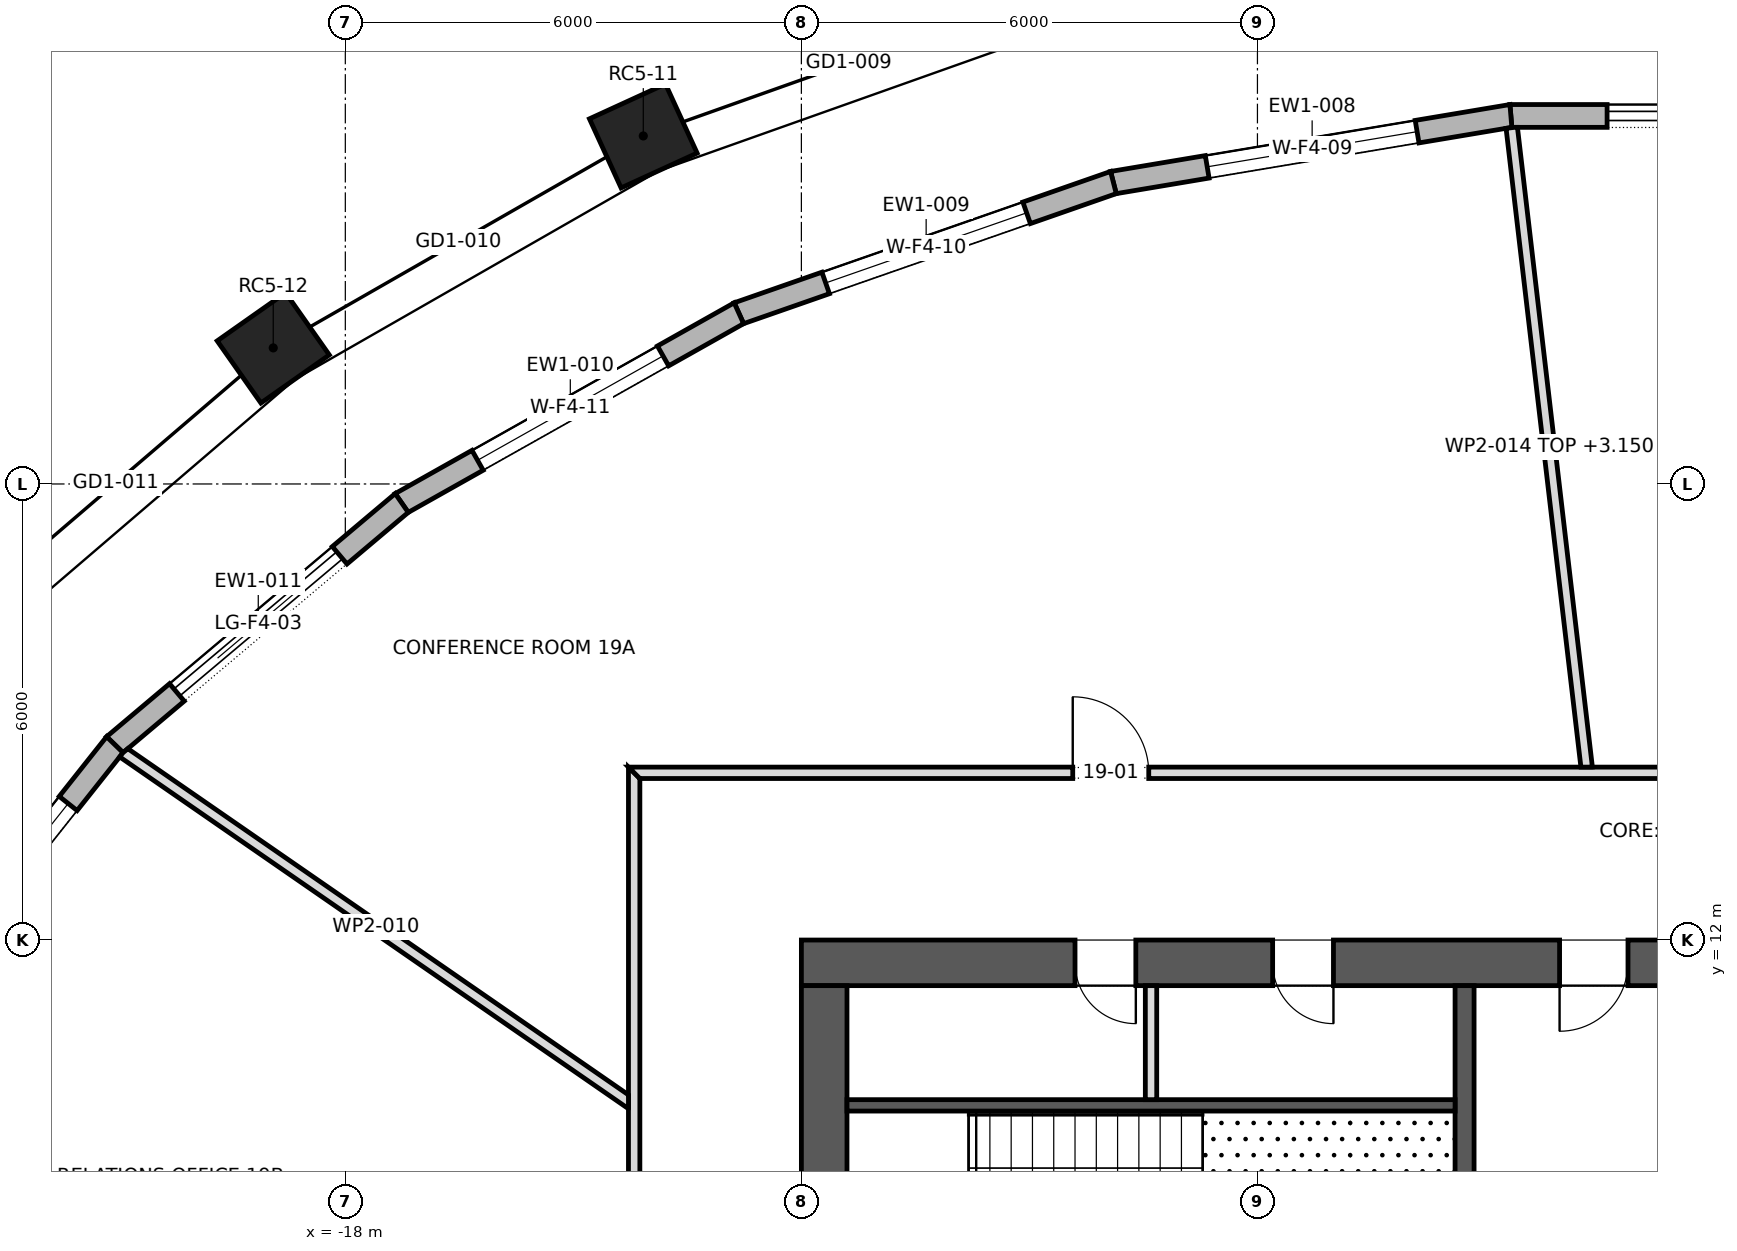
"""IFC4 building model, lengths in metres.
Left out: names, types, materials, properties, quantities, classifications, styles, units other than length and angle.
Written with IfcOpenShell. Run it as: python <this file> out.ifc"""

import sys

from ifc_helpers import new_model, si_unit, direction, frame, frame_2d, origin, origin_2d, place, context, subcontext, project, spatial, polyline, rectangle, outline, extrude, element, fill, save


model = new_model("IFC4")
c1 = context("Model", 3, precision=1e-05, world=origin(), true_north=direction((0.0, 1.0)))
c2 = subcontext(c1, "Body", "Model", "MODEL_VIEW")
j1 = project(units=[si_unit("LENGTHUNIT", "METRE"), si_unit("PLANEANGLEUNIT", "RADIAN")], contexts=[c1])
p1 = place(None, origin())
s1 = spatial("IfcSite", under=j1, at=p1, CompositionType="ELEMENT")
p2 = place(p1, origin())
s2 = spatial("IfcBuilding", under=s1, at=p2, CompositionType="ELEMENT")
p3 = place(p2, frame((0.0, 0.0, 268.3)))
s3 = spatial("IfcBuildingStorey", under=s2, at=p3, CompositionType="ELEMENT", Elevation=268.3)
for number, where, z_axis, x_axis in (
    (1, (-14.08, 22.579, 0.0), (0.0, 0.0, 1.0), (-0.909, -0.417, 0.0)),
    (2, (-18.948, 19.79, 0.0), (0.0, 0.0, 1.0), (-0.818, -0.575, 0.0)),
):
    element("IfcColumn", number, at=place(p3, frame(where, z_axis=z_axis, x_axis=x_axis)), inside=s3, PredefinedType="COLUMN", context=c2, shape_type="SweptSolid", body=[
        extrude(rectangle(XDim=1.1, YDim=1.0, at=origin_2d()), origin(), (0.0, 0.0, 1.0), 4.0),
    ])
p4 = place(p3, frame((-12.0, 11.7, 0.0), z_axis=(0.0, 0.0, 1.0), x_axis=(1.0, 0.0, 0.0)))
e3 = element("IfcWall", 3, at=p4, inside=s3, PredefinedType="SHEAR", context=c2, shape_type="SweptSolid", body=[
    extrude(rectangle(XDim=24.0, YDim=0.6, at=frame_2d((12.0, 0.0))), origin(), (0.0, 0.0, 1.0), 4.0),
])
p5 = place(p4, frame((9.975, 0.0, 0.0)))
e4 = element("IfcOpeningElement", 4, at=p5, cuts=e3, PredefinedType="OPENING", context=c2, shape_type="SweptSolid", body=[
    extrude(rectangle(XDim=0.9, YDim=2.1, at=frame_2d((0.45, 1.05))), frame((0.0, 0.312, 0.0), z_axis=(0.0, -1.0, 0.0), x_axis=(1.0, 0.0, 0.0)), (0.0, 0.0, 1.0), 0.624),
])
p6 = place(p4, frame((3.6, 0.0, 0.0)))
e5 = element("IfcOpeningElement", 5, at=p6, cuts=e3, PredefinedType="OPENING", context=c2, shape_type="SweptSolid", body=[
    extrude(rectangle(XDim=0.8, YDim=2.1, at=frame_2d((0.4, 1.05))), frame((0.0, 0.312, 0.0), z_axis=(0.0, -1.0, 0.0), x_axis=(1.0, 0.0, 0.0)), (0.0, 0.0, 1.0), 0.624),
])
p7 = place(p4, frame((6.2, 0.0, 0.0)))
e6 = element("IfcOpeningElement", 6, at=p7, cuts=e3, PredefinedType="OPENING", context=c2, shape_type="SweptSolid", body=[
    extrude(rectangle(XDim=0.8, YDim=2.1, at=frame_2d((0.4, 1.05))), frame((0.0, 0.312, 0.0), z_axis=(0.0, -1.0, 0.0), x_axis=(1.0, 0.0, 0.0)), (0.0, 0.0, 1.0), 0.624),
])
p8 = place(p4, frame((15.85, 0.0, 0.0)))
e7 = element("IfcOpeningElement", 7, at=p8, cuts=e3, PredefinedType="OPENING", context=c2, shape_type="SweptSolid", body=[
    extrude(rectangle(XDim=0.8, YDim=2.1, at=frame_2d((0.4, 1.05))), frame((0.0, 0.312, 0.0), z_axis=(0.0, -1.0, 0.0), x_axis=(1.0, 0.0, 0.0)), (0.0, 0.0, 1.0), 0.624),
])
p9 = place(p3, frame((-11.7, -11.4, 0.0), z_axis=(0.0, 0.0, 1.0), x_axis=(0.0, 1.0, 0.0)))
e8 = element("IfcWall", 8, at=p9, inside=s3, PredefinedType="SHEAR", context=c2, shape_type="SweptSolid", body=[
    extrude(rectangle(XDim=22.8, YDim=0.6, at=frame_2d((11.4, 0.0))), origin(), (0.0, 0.0, 1.0), 4.0),
])
p10 = place(p9, frame((10.2, 0.0, 0.0)))
e9 = element("IfcOpeningElement", 9, at=p10, cuts=e8, PredefinedType="OPENING", context=c2, shape_type="SweptSolid", body=[
    extrude(rectangle(XDim=2.4, YDim=2.1, at=frame_2d((1.2, 1.05))), frame((0.0, 0.312, 0.0), z_axis=(0.0, -1.0, 0.0), x_axis=(1.0, 0.0, 0.0)), (0.0, 0.0, 1.0), 0.624),
])
p11 = place(p9, frame((18.925, 0.0, 0.0)))
e10 = element("IfcOpeningElement", 10, at=p11, cuts=e8, PredefinedType="OPENING", context=c2, shape_type="SweptSolid", body=[
    extrude(rectangle(XDim=1.2, YDim=2.1, at=frame_2d((0.6, 1.05))), frame((0.0, 0.312, 0.0), z_axis=(0.0, -1.0, 0.0), x_axis=(1.0, 0.0, 0.0)), (0.0, 0.0, 1.0), 0.624),
])
p12 = place(p9, frame((2.675, 0.0, 0.0)))
e11 = element("IfcOpeningElement", 11, at=p12, cuts=e8, PredefinedType="OPENING", context=c2, shape_type="SweptSolid", body=[
    extrude(rectangle(XDim=1.2, YDim=2.1, at=frame_2d((0.6, 1.05))), frame((0.0, 0.312, 0.0), z_axis=(0.0, -1.0, 0.0), x_axis=(1.0, 0.0, 0.0)), (0.0, 0.0, 1.0), 0.624),
])
p13 = place(p3, frame((2.666, 22.842, 0.0), z_axis=(0.0, 0.0, 1.0), x_axis=(-1.0, 0.0, 0.0)))
e12 = element("IfcWall", 12, at=p13, inside=s3, PredefinedType="STANDARD", context=c2, shape_type="SweptSolid", body=[
    extrude(outline(polyline([(-0.012, -0.15), (5.344, -0.15), (5.319, 0.15), (0.012, 0.15), (-0.012, -0.15)])), origin(), (0.0, 0.0, 1.0), 3.7),
])
p14 = place(p13, frame((1.266, 0.0, 0.0)))
e13 = element("IfcOpeningElement", 13, at=p14, cuts=e12, PredefinedType="OPENING", context=c2, shape_type="SweptSolid", body=[
    extrude(rectangle(XDim=2.8, YDim=3.25, at=frame_2d((1.4, 1.625))), frame((0.0, 0.162, 0.0), z_axis=(0.0, -1.0, 0.0), x_axis=(1.0, 0.0, 0.0)), (0.0, 0.0, 1.0), 0.324),
])
p15 = place(p3, frame((-2.666, 22.842, 0.0), z_axis=(0.0, 0.0, 1.0), x_axis=(-0.986250435411, -0.165257612993, 0.0)))
e14 = element("IfcWall", 14, at=p15, inside=s3, PredefinedType="STANDARD", context=c2, shape_type="SweptSolid", body=[
    extrude(outline(polyline([(-0.012, -0.15), (5.315, -0.15), (5.29, 0.15), (0.012, 0.15), (-0.012, -0.15)])), origin(), (0.0, 0.0, 1.0), 3.7),
])
p16 = place(p15, frame((1.251, 0.0, 0.6)))
e15 = element("IfcOpeningElement", 15, at=p16, cuts=e14, PredefinedType="OPENING", context=c2, shape_type="SweptSolid", body=[
    extrude(rectangle(XDim=2.8, YDim=2.65, at=frame_2d((1.4, 1.325))), frame((0.0, 0.162, 0.0), z_axis=(0.0, -1.0, 0.0), x_axis=(1.0, 0.0, 0.0)), (0.0, 0.0, 1.0), 0.324),
])
p17 = place(p3, frame((-7.895, 21.966, 0.0), z_axis=(0.0, 0.0, 1.0), x_axis=(-0.9441693858, -0.329460423904, 0.0)))
e16 = element("IfcWall", 16, at=p17, inside=s3, PredefinedType="STANDARD", context=c2, shape_type="SweptSolid", body=[
    extrude(outline(polyline([(-0.013, -0.15), (5.232, -0.15), (5.205, 0.15), (0.013, 0.15), (-0.013, -0.15)])), origin(), (0.0, 0.0, 1.0), 3.7),
])
p18 = place(p17, frame((1.209, 0.0, 0.6)))
e17 = element("IfcOpeningElement", 17, at=p18, cuts=e16, PredefinedType="OPENING", context=c2, shape_type="SweptSolid", body=[
    extrude(rectangle(XDim=2.8, YDim=2.65, at=frame_2d((1.4, 1.325))), frame((0.0, 0.162, 0.0), z_axis=(0.0, -1.0, 0.0), x_axis=(1.0, 0.0, 0.0)), (0.0, 0.0, 1.0), 0.324),
])
p19 = place(p3, frame((-12.822, 20.246, 0.0), z_axis=(0.0, 0.0, 1.0), x_axis=(-0.871433320402, -0.490513983585, 0.0)))
e18 = element("IfcWall", 18, at=p19, inside=s3, PredefinedType="STANDARD", context=c2, shape_type="SweptSolid", body=[
    extrude(outline(polyline([(-0.013, -0.15), (5.104, -0.15), (5.076, 0.15), (0.013, 0.15), (-0.013, -0.15)])), origin(), (0.0, 0.0, 1.0), 3.7),
])
p20 = place(p19, frame((1.145, 0.0, 0.6)))
e19 = element("IfcOpeningElement", 19, at=p20, cuts=e18, PredefinedType="OPENING", context=c2, shape_type="SweptSolid", body=[
    extrude(rectangle(XDim=2.8, YDim=2.65, at=frame_2d((1.4, 1.325))), frame((0.0, 0.162, 0.0), z_axis=(0.0, -1.0, 0.0), x_axis=(1.0, 0.0, 0.0)), (0.0, 0.0, 1.0), 0.324),
])
p21 = place(p3, frame((-17.258, 17.75, 0.0), z_axis=(0.0, 0.0, 1.0), x_axis=(-0.764832940795, -0.644228664897, 0.0)))
e20 = element("IfcWall", 20, at=p21, inside=s3, PredefinedType="STANDARD", context=c2, shape_type="SweptSolid", body=[
    extrude(outline(polyline([(-0.014, -0.15), (4.95, -0.15), (4.92, 0.15), (0.014, 0.15), (-0.014, -0.15)])), origin(), (0.0, 0.0, 1.0), 3.7),
])
p22 = place(p21, frame((1.068, 0.0, 0.0)))
e21 = element("IfcOpeningElement", 21, at=p22, cuts=e20, PredefinedType="OPENING", context=c2, shape_type="SweptSolid", body=[
    extrude(rectangle(XDim=2.8, YDim=3.25, at=frame_2d((1.4, 1.625))), frame((0.0, 0.162, 0.0), z_axis=(0.0, -1.0, 0.0), x_axis=(1.0, 0.0, 0.0)), (0.0, 0.0, 1.0), 0.324),
])
p23 = place(p3, frame((-21.032, 14.57, 0.0), z_axis=(0.0, 0.0, 1.0), x_axis=(-0.621434755851, -0.783465917715, 0.0)))
e22 = element("IfcWall", 22, at=p23, inside=s3, PredefinedType="STANDARD", context=c2, shape_type="SweptSolid", body=[
    extrude(outline(polyline([(-0.015, -0.15), (4.791, -0.15), (4.759, 0.15), (0.015, 0.15), (-0.015, -0.15)])), origin(), (0.0, 0.0, 1.0), 3.7),
])
p24 = place(p23, frame((0.987, 0.0, 0.6)))
e23 = element("IfcOpeningElement", 23, at=p24, cuts=e22, PredefinedType="OPENING", context=c2, shape_type="SweptSolid", body=[
    extrude(rectangle(XDim=2.8, YDim=2.65, at=frame_2d((1.4, 1.325))), frame((0.0, 0.162, 0.0), z_axis=(0.0, -1.0, 0.0), x_axis=(1.0, 0.0, 0.0)), (0.0, 0.0, 1.0), 0.324),
])
p25 = place(p3, frame((-3.275, 6.5, 0.0), z_axis=(0.0, 0.0, 1.0), x_axis=(0.0, 1.0, 0.0)))
e24 = element("IfcWall", 24, at=p25, inside=s3, PredefinedType="SHEAR", context=c2, shape_type="SweptSolid", body=[
    extrude(rectangle(XDim=4.9, YDim=0.25, at=frame_2d((2.45, 0.0))), origin(), (0.0, 0.0, 1.0), 3.7),
])
p26 = place(p3, frame((-11.4, 9.825, 0.0), z_axis=(0.0, 0.0, 1.0), x_axis=(1.0, 0.0, 0.0)))
e25 = element("IfcWall", 25, at=p26, inside=s3, PredefinedType="SHEAR", context=c2, shape_type="SweptSolid", body=[
    extrude(rectangle(XDim=8.0, YDim=0.15, at=frame_2d((4.0, 0.0))), origin(), (0.0, 0.0, 1.0), 3.7),
])
p27 = place(p3, frame((-7.4, 9.9, 0.0), z_axis=(0.0, 0.0, 1.0), x_axis=(0.0, 1.0, 0.0)))
e26 = element("IfcWall", 26, at=p27, inside=s3, PredefinedType="PARTITIONING", context=c2, shape_type="SweptSolid", body=[
    extrude(rectangle(XDim=1.5, YDim=0.15, at=frame_2d((0.75, 0.0))), origin(), (0.0, 0.0, 1.0), 3.7),
])
p28 = place(p3, frame((-14.2, -14.275, 0.0), z_axis=(0.0, 0.0, 1.0), x_axis=(0.0, 1.0, 0.0)))
e27 = element("IfcWall", 27, at=p28, inside=s3, PredefinedType="PARTITIONING", context=c2, shape_type="SweptSolid", body=[
    extrude(outline(polyline([(0.15, -0.075), (2.033, -0.075), (3.917, -0.075), (5.8, -0.075), (7.683, -0.075), (9.567, -0.075), (11.45, -0.075), (13.333, -0.075), (15.217, -0.075), (17.1, -0.075), (18.983, -0.075), (20.866, -0.075), (22.75, -0.075), (24.633, -0.075), (26.517, -0.075), (28.4, -0.075), (28.55, 0.075), (28.55, 0.075), (26.646, 0.075), (24.743, 0.075), (22.84, 0.075), (20.937, 0.075), (19.033, 0.075), (17.13, 0.075), (15.227, 0.075), (13.323, 0.075), (11.42, 0.075), (9.517, 0.075), (7.613, 0.075), (5.71, 0.075), (3.807, 0.075), (1.903, 0.075), (0.0, 0.075), (0.15, -0.075)])), origin(), (0.0, 0.0, 1.0), 3.7),
])
p29 = place(p28, frame((20.5, 0.0, 0.0)))
e28 = element("IfcOpeningElement", 28, at=p29, cuts=e27, PredefinedType="OPENING", context=c2, shape_type="SweptSolid", body=[
    extrude(rectangle(XDim=1.0, YDim=2.1, at=frame_2d((0.5, 1.05))), frame((0.0, 0.087, 0.0), z_axis=(0.0, -1.0, 0.0), x_axis=(1.0, 0.0, 0.0)), (0.0, 0.0, 1.0), 0.174),
])
p30 = place(p28, frame((11.595, 0.0, 0.0)))
e29 = element("IfcOpeningElement", 29, at=p30, cuts=e27, PredefinedType="OPENING", context=c2, shape_type="SweptSolid", body=[
    extrude(rectangle(XDim=1.0, YDim=2.1, at=frame_2d((0.5, 1.05))), frame((0.0, 0.087, 0.0), z_axis=(0.0, -1.0, 0.0), x_axis=(1.0, 0.0, 0.0)), (0.0, 0.0, 1.0), 0.174),
])
p31 = place(p28, frame((15.225, 0.0, 0.0)))
e30 = element("IfcOpeningElement", 30, at=p31, cuts=e27, PredefinedType="OPENING", context=c2, shape_type="SweptSolid", body=[
    extrude(rectangle(XDim=1.0, YDim=2.1, at=frame_2d((0.5, 1.05))), frame((0.0, 0.087, 0.0), z_axis=(0.0, -1.0, 0.0), x_axis=(1.0, 0.0, 0.0)), (0.0, 0.0, 1.0), 0.174),
])
p32 = place(p28, frame((4.86, 0.0, 0.0)))
e31 = element("IfcOpeningElement", 31, at=p32, cuts=e27, PredefinedType="OPENING", context=c2, shape_type="SweptSolid", body=[
    extrude(rectangle(XDim=1.0, YDim=2.1, at=frame_2d((0.5, 1.05))), frame((0.0, 0.087, 0.0), z_axis=(0.0, -1.0, 0.0), x_axis=(1.0, 0.0, 0.0)), (0.0, 0.0, 1.0), 0.174),
])
p33 = place(p3, frame((-14.232, 9.843, 0.0), z_axis=(0.0, 0.0, 1.0), x_axis=(-0.822495571588, 0.56877151363, 0.0)))
e32 = element("IfcWall", 32, at=p33, inside=s3, PredefinedType="PARTITIONING", context=c2, shape_type="SweptSolid", body=[
    extrude(outline(polyline([(0.104, -0.075), (1.705, -0.075), (3.307, -0.075), (4.908, -0.075), (6.51, -0.075), (8.112, -0.075), (8.133, 0.004), (8.137, 0.07), (8.137, 0.075), (6.51, 0.075), (4.883, 0.075), (3.255, 0.075), (1.627, 0.075), (0.0, 0.075), (0.0, 0.075), (0.104, -0.075)])), origin(), (0.0, 0.0, 1.0), 3.7),
])
p34 = place(p3, frame((-14.275, 14.2, 0.0), z_axis=(0.0, 0.0, 1.0), x_axis=(1.0, 0.0, 0.0)))
e33 = element("IfcWall", 33, at=p34, inside=s3, PredefinedType="PARTITIONING", context=c2, shape_type="SweptSolid", body=[
    extrude(outline(polyline([(0.15, -0.075), (2.033, -0.075), (3.917, -0.075), (5.8, -0.075), (7.683, -0.075), (9.567, -0.075), (11.45, -0.075), (13.333, -0.075), (15.217, -0.075), (17.1, -0.075), (18.983, -0.075), (20.866, -0.075), (22.75, -0.075), (24.633, -0.075), (26.517, -0.075), (28.4, -0.075), (28.55, 0.075), (28.55, 0.075), (26.646, 0.075), (24.743, 0.075), (22.84, 0.075), (20.937, 0.075), (19.033, 0.075), (17.13, 0.075), (15.227, 0.075), (13.323, 0.075), (11.42, 0.075), (9.517, 0.075), (7.613, 0.075), (5.71, 0.075), (3.807, 0.075), (1.903, 0.075), (0.0, 0.075), (0.15, -0.075)])), origin(), (0.0, 0.0, 1.0), 3.7),
])
p35 = place(p34, frame((5.845, 0.0, 0.0)))
e34 = element("IfcOpeningElement", 34, at=p35, cuts=e33, PredefinedType="OPENING", context=c2, shape_type="SweptSolid", body=[
    extrude(rectangle(XDim=1.0, YDim=2.1, at=frame_2d((0.5, 1.05))), frame((0.0, 0.087, 0.0), z_axis=(0.0, -1.0, 0.0), x_axis=(1.0, 0.0, 0.0)), (0.0, 0.0, 1.0), 0.174),
])
p36 = place(p34, frame((19.86, 0.0, 0.0)))
e35 = element("IfcOpeningElement", 35, at=p36, cuts=e33, PredefinedType="OPENING", context=c2, shape_type="SweptSolid", body=[
    extrude(rectangle(XDim=1.0, YDim=2.1, at=frame_2d((0.5, 1.05))), frame((0.0, 0.087, 0.0), z_axis=(0.0, -1.0, 0.0), x_axis=(1.0, 0.0, 0.0)), (0.0, 0.0, 1.0), 0.174),
])
p37 = place(p3, frame((-2.655, 22.688, 0.0), z_axis=(0.0, 0.0, 1.0), x_axis=(0.116390143686, -0.993203571506, 0.0)))
e36 = element("IfcWall", 36, at=p37, inside=s3, PredefinedType="PARTITIONING", context=c2, shape_type="SweptSolid", body=[
    extrude(outline(polyline([(0.0, -0.075), (1.692, -0.075), (3.385, -0.075), (5.077, -0.075), (6.769, -0.075), (8.461, -0.075), (8.479, 0.072), (8.479, 0.075), (6.784, 0.075), (5.089, 0.075), (3.394, 0.075), (1.699, 0.075), (0.005, 0.075), (0.0, 0.036), (0.0, -0.075)])), origin(), (0.0, 0.0, 1.0), 3.15),
])
p38 = place(p14, origin())
e37 = element("IfcDoor", 37, at=p38, inside=s3, OperationType="DOUBLE_DOOR_SLIDING", PredefinedType="DOOR", context=c2, shape_type="SweptSolid", body=[
    extrude(rectangle(XDim=2.8, YDim=3.25, at=frame_2d((1.4, 1.625))), frame((0.0, 0.025, 0.0), z_axis=(0.0, -1.0, 0.0), x_axis=(1.0, 0.0, 0.0)), (0.0, 0.0, 1.0), 0.05),
])
fill(e13, e37)
p39 = place(p16, origin())
e38 = element("IfcWindow", 38, at=p39, inside=s3, PartitioningType="DOUBLE_PANEL_VERTICAL", PredefinedType="WINDOW", context=c2, shape_type="SweptSolid", body=[
    extrude(rectangle(XDim=2.8, YDim=2.65, at=frame_2d((1.4, 1.325))), frame((0.0, 0.03, 0.0), z_axis=(0.0, -1.0, 0.0), x_axis=(1.0, 0.0, 0.0)), (0.0, 0.0, 1.0), 0.06),
])
fill(e15, e38)
p40 = place(p18, origin())
e39 = element("IfcWindow", 39, at=p40, inside=s3, PartitioningType="DOUBLE_PANEL_VERTICAL", PredefinedType="WINDOW", context=c2, shape_type="SweptSolid", body=[
    extrude(rectangle(XDim=2.8, YDim=2.65, at=frame_2d((1.4, 1.325))), frame((0.0, 0.03, 0.0), z_axis=(0.0, -1.0, 0.0), x_axis=(1.0, 0.0, 0.0)), (0.0, 0.0, 1.0), 0.06),
])
fill(e17, e39)
p41 = place(p20, origin())
e40 = element("IfcWindow", 40, at=p41, inside=s3, PartitioningType="DOUBLE_PANEL_VERTICAL", PredefinedType="WINDOW", context=c2, shape_type="SweptSolid", body=[
    extrude(rectangle(XDim=2.8, YDim=2.65, at=frame_2d((1.4, 1.325))), frame((0.0, 0.03, 0.0), z_axis=(0.0, -1.0, 0.0), x_axis=(1.0, 0.0, 0.0)), (0.0, 0.0, 1.0), 0.06),
])
fill(e19, e40)
p42 = place(p22, origin())
e41 = element("IfcDoor", 41, at=p42, inside=s3, OperationType="DOUBLE_DOOR_SLIDING", PredefinedType="DOOR", context=c2, shape_type="SweptSolid", body=[
    extrude(rectangle(XDim=2.8, YDim=3.25, at=frame_2d((1.4, 1.625))), frame((0.0, 0.025, 0.0), z_axis=(0.0, -1.0, 0.0), x_axis=(1.0, 0.0, 0.0)), (0.0, 0.0, 1.0), 0.05),
])
fill(e21, e41)
p43 = place(p24, origin())
e42 = element("IfcWindow", 42, at=p43, inside=s3, PartitioningType="DOUBLE_PANEL_VERTICAL", PredefinedType="WINDOW", context=c2, shape_type="SweptSolid", body=[
    extrude(rectangle(XDim=2.8, YDim=2.65, at=frame_2d((1.4, 1.325))), frame((0.0, 0.03, 0.0), z_axis=(0.0, -1.0, 0.0), x_axis=(1.0, 0.0, 0.0)), (0.0, 0.0, 1.0), 0.06),
])
fill(e23, e42)
p44 = place(p5, frame((0.9, 0.0, 0.0), z_axis=(0.0, 0.0, 1.0), x_axis=(-1.0, 0.0, 0.0)))
e43 = element("IfcDoor", 43, at=p44, inside=s3, OperationType="SINGLE_SWING_LEFT", PredefinedType="DOOR", context=c2, shape_type="SweptSolid", body=[
    extrude(rectangle(XDim=0.9, YDim=2.1, at=frame_2d((0.45, 1.05))), frame((0.0, 0.025, 0.0), z_axis=(0.0, -1.0, 0.0), x_axis=(1.0, 0.0, 0.0)), (0.0, 0.0, 1.0), 0.05),
])
fill(e4, e43)
p45 = place(p6, frame((0.8, 0.0, 0.0), z_axis=(0.0, 0.0, 1.0), x_axis=(-1.0, 0.0, 0.0)))
e44 = element("IfcDoor", 44, at=p45, inside=s3, OperationType="SINGLE_SWING_RIGHT", PredefinedType="DOOR", context=c2, shape_type="SweptSolid", body=[
    extrude(rectangle(XDim=0.8, YDim=2.1, at=frame_2d((0.4, 1.05))), frame((0.0, 0.025, 0.0), z_axis=(0.0, -1.0, 0.0), x_axis=(1.0, 0.0, 0.0)), (0.0, 0.0, 1.0), 0.05),
])
fill(e5, e44)
p46 = place(p7, frame((0.8, 0.0, 0.0), z_axis=(0.0, 0.0, 1.0), x_axis=(-1.0, 0.0, 0.0)))
e45 = element("IfcDoor", 45, at=p46, inside=s3, OperationType="SINGLE_SWING_RIGHT", PredefinedType="DOOR", context=c2, shape_type="SweptSolid", body=[
    extrude(rectangle(XDim=0.8, YDim=2.1, at=frame_2d((0.4, 1.05))), frame((0.0, 0.025, 0.0), z_axis=(0.0, -1.0, 0.0), x_axis=(1.0, 0.0, 0.0)), (0.0, 0.0, 1.0), 0.05),
])
fill(e6, e45)
p47 = place(p35, origin())
e46 = element("IfcDoor", 46, at=p47, inside=s3, OperationType="SINGLE_SWING_RIGHT", PredefinedType="DOOR", context=c2, shape_type="SweptSolid", body=[
    extrude(rectangle(XDim=1.0, YDim=2.1, at=frame_2d((0.5, 1.05))), frame((0.0, 0.025, 0.0), z_axis=(0.0, -1.0, 0.0), x_axis=(1.0, 0.0, 0.0)), (0.0, 0.0, 1.0), 0.05),
])
fill(e34, e46)
save(model, sys.argv[1])
